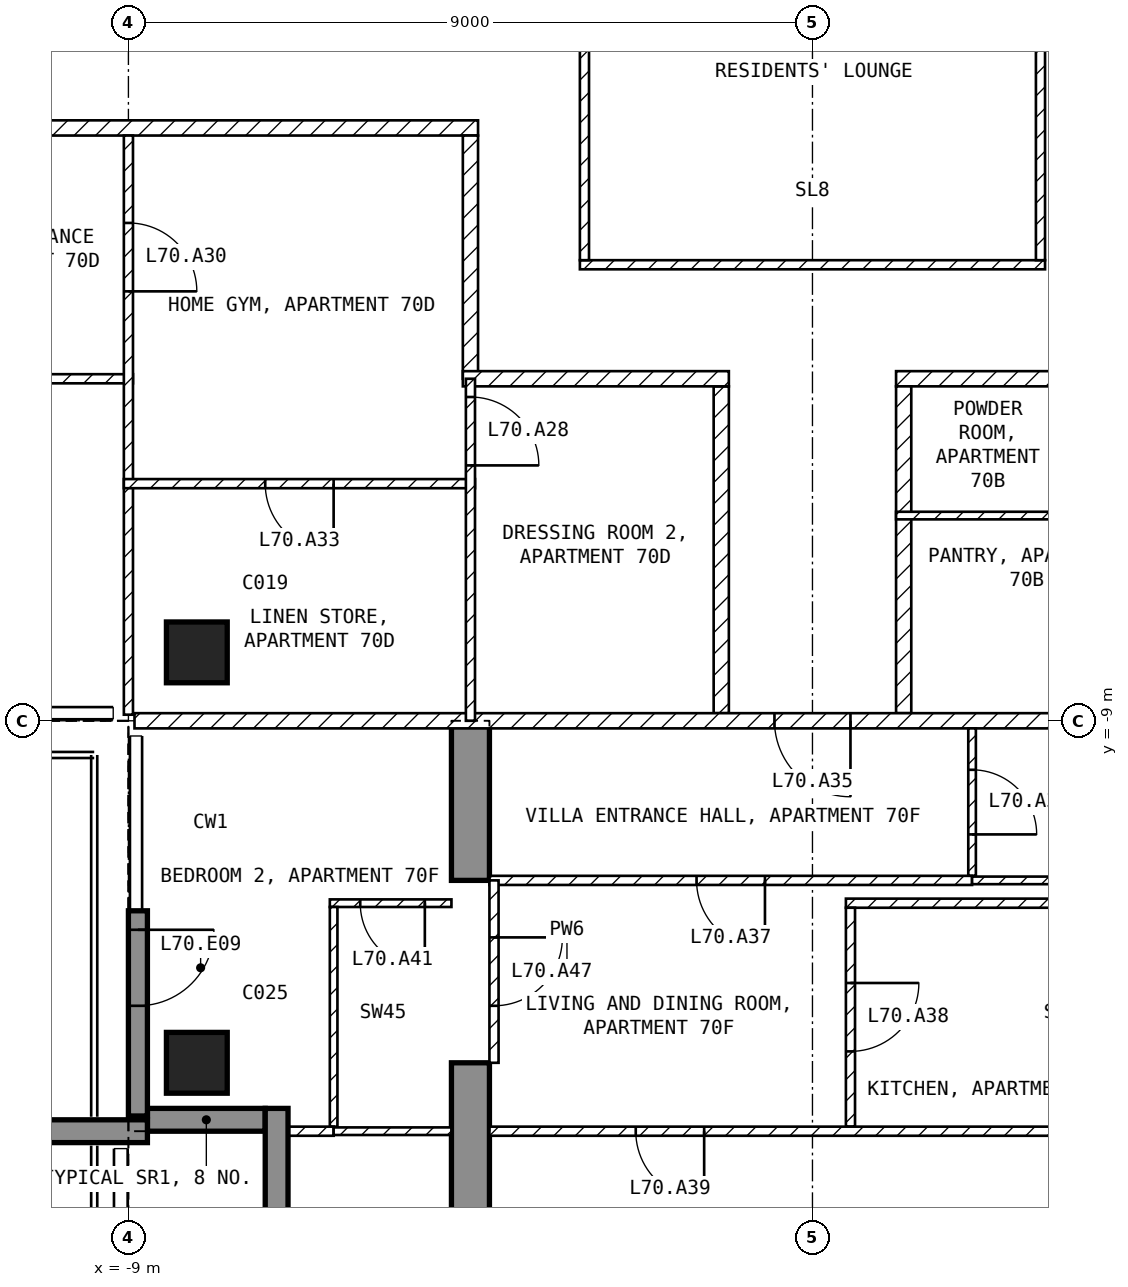
"""IFC4 building model, lengths in metres.
Left out: names, types, materials, properties, quantities, classifications, styles, units other than length and angle.
Written with IfcOpenShell. Run it as: python <this file> out.ifc"""

import sys

from ifc_helpers import new_model, si_unit, direction, frame, frame_2d, origin, origin_2d, place, context, subcontext, project, spatial, polyline, rectangle, outline, extrude, element, fill, save


model = new_model("IFC4")
c1 = context("Model", 3, precision=1e-05, world=origin(), true_north=direction((0.0, 1.0)))
c2 = subcontext(c1, "Body", "Model", "MODEL_VIEW")
j1 = project(units=[si_unit("LENGTHUNIT", "METRE"), si_unit("PLANEANGLEUNIT", "RADIAN")], contexts=[c1])
p1 = place(None, origin())
s1 = spatial("IfcSite", under=j1, at=p1, CompositionType="ELEMENT")
p2 = place(p1, origin())
s2 = spatial("IfcBuilding", under=s1, at=p2, CompositionType="ELEMENT")
p3 = place(p2, frame((0.0, 0.0, 274.5)))
s3 = spatial("IfcBuildingStorey", under=s2, at=p3, CompositionType="ELEMENT", Elevation=274.5)
for number, where, z_axis, x_axis in (
    (1, (-8.1, -13.5, -0.25), (0.0, 0.0, 1.0), (1.0, 0.0, 0.0)),
    (2, (-8.1, -8.1, -0.25), (0.0, 0.0, 1.0), (1.0, 0.0, 0.0)),
):
    element("IfcColumn", number, at=place(p3, frame(where, z_axis=z_axis, x_axis=x_axis)), inside=s3, PredefinedType="COLUMN", context=c2, shape_type="SweptSolid", body=[
        extrude(rectangle(XDim=0.8, YDim=0.8, at=origin_2d()), origin(), (0.0, 0.0, 1.0), 3.5),
    ])
p4 = place(p3, frame((-4.75, -16.7, -0.25), z_axis=(1.0, 0.0, 0.0), x_axis=(0.0, 1.0, 0.0)))
e3 = element("IfcWall", 3, at=p4, inside=s3, PredefinedType="SHEAR", context=c2, shape_type="SweptSolid", body=[
    extrude(outline(polyline([(0.0, 0.0), (3.2, 0.0), (3.2, 2.65), (5.6, 2.65), (5.6, 0.0), (7.7, 0.0), (7.7, 3.5), (0.0, 3.5), (0.0, 0.0)])), origin(), (0.0, 0.0, 1.0), 0.5),
])
p5 = place(p3, frame((-8.875, -11.5, 0.0), z_axis=(0.0, 0.0, 1.0), x_axis=(0.0, -1.0, 0.0)))
e4 = element("IfcWall", 4, at=p5, inside=s3, PredefinedType="SOLIDWALL", context=c2, shape_type="SweptSolid", body=[
    extrude(rectangle(XDim=2.7, YDim=0.25, at=frame_2d((1.35, 0.0))), origin(), (0.0, 0.0, 1.0), 3.25),
])
p6 = place(p5, frame((0.25, 0.0, 0.0)))
e5 = element("IfcOpeningElement", 5, at=p6, cuts=e4, PredefinedType="OPENING", context=c2, shape_type="SweptSolid", body=[
    extrude(rectangle(XDim=1.0, YDim=2.4, at=frame_2d((0.5, 1.2))), frame((0.0, 0.135, 0.0), z_axis=(0.0, -1.0, 0.0), x_axis=(1.0, 0.0, 0.0)), (0.0, 0.0, 1.0), 0.27),
])
p7 = place(p3, frame((-8.75, -14.25, 0.0), z_axis=(0.0, 0.0, 1.0), x_axis=(1.0, 0.0, 0.0)))
e6 = element("IfcWall", 6, at=p7, inside=s3, PredefinedType="SOLIDWALL", context=c2, shape_type="SweptSolid", body=[
    extrude(rectangle(XDim=1.55, YDim=0.3, at=frame_2d((0.775, 0.0))), origin(), (0.0, 0.0, 1.0), 3.25),
])
p8 = place(p3, frame((-7.05, -14.1, 0.0), z_axis=(0.0, 0.0, 1.0), x_axis=(0.0, -1.0, 0.0)))
e7 = element("IfcWall", 7, at=p8, inside=s3, PredefinedType="SOLIDWALL", context=c2, shape_type="SweptSolid", body=[
    extrude(rectangle(XDim=1.8, YDim=0.3, at=frame_2d((0.9, 0.0))), origin(), (0.0, 0.0, 1.0), 3.25),
])
p9 = place(p3, frame((-8.75, -14.4, 0.0), z_axis=(0.0, 0.0, 1.0), x_axis=(-1.0, 0.0, 0.0)))
e8 = element("IfcWall", 8, at=p9, inside=s3, PredefinedType="SOLIDWALL", context=c2, shape_type="SweptSolid", body=[
    extrude(rectangle(XDim=2.95, YDim=0.3, at=frame_2d((1.475, 0.0))), origin(), (0.0, 0.0, 1.0), 3.25),
])
p10 = place(p3, frame((-3.06, -3.0, 0.0), z_axis=(0.0, 0.0, 1.0), x_axis=(1.0, 0.0, 0.0)))
e9 = element("IfcWall", 9, at=p10, inside=s3, PredefinedType="PARTITIONING", context=c2, shape_type="SweptSolid", body=[
    extrude(rectangle(XDim=6.12, YDim=0.12, at=frame_2d((3.06, 0.0))), origin(), (0.0, 0.0, 1.0), 3.25),
])
for number, where, z_axis, x_axis in (
    (10, (3.0, -2.94, 0.0), (0.0, 0.0, 1.0), (0.0, 1.0, 0.0)),
    (11, (-3.0, 2.94, 0.0), (0.0, 0.0, 1.0), (0.0, -1.0, 0.0)),
):
    element("IfcWall", number, at=place(p3, frame(where, z_axis=z_axis, x_axis=x_axis)), inside=s3, PredefinedType="PARTITIONING", context=c2, shape_type="SweptSolid", body=[
        extrude(rectangle(XDim=5.88, YDim=0.12, at=frame_2d((2.94, 0.0))), origin(), (0.0, 0.0, 1.0), 3.25),
    ])
p11 = place(p3, frame((4.6, -4.5, 0.0), z_axis=(0.0, 0.0, 1.0), x_axis=(-1.0, 0.0, 0.0)))
e12 = element("IfcWall", 12, at=p11, inside=s3, PredefinedType="PARTITIONING", context=c2, shape_type="SweptSolid", body=[
    extrude(rectangle(XDim=3.5, YDim=0.2, at=frame_2d((1.75, 0.0))), origin(), (0.0, 0.0, 1.0), 3.25),
])
p12 = place(p3, frame((1.2, -4.6, 0.0), z_axis=(0.0, 0.0, 1.0), x_axis=(0.0, -1.0, 0.0)))
e13 = element("IfcWall", 13, at=p12, inside=s3, PredefinedType="PARTITIONING", context=c2, shape_type="SweptSolid", body=[
    extrude(rectangle(XDim=4.3, YDim=0.2, at=frame_2d((2.15, 0.0))), origin(), (0.0, 0.0, 1.0), 3.25),
])
p13 = place(p3, frame((-4.4, -1.2, 0.0), z_axis=(0.0, 0.0, 1.0), x_axis=(-1.0, 0.0, 0.0)))
e14 = element("IfcWall", 14, at=p13, inside=s3, PredefinedType="PARTITIONING", context=c2, shape_type="SweptSolid", body=[
    extrude(rectangle(XDim=17.2, YDim=0.2, at=frame_2d((8.6, 0.0))), origin(), (0.0, 0.0, 1.0), 3.25),
])
p14 = place(p13, frame((5.9, 0.0, 0.0)))
e15 = element("IfcOpeningElement", 15, at=p14, cuts=e14, PredefinedType="OPENING", context=c2, shape_type="SweptSolid", body=[
    extrude(rectangle(XDim=1.0, YDim=2.1, at=frame_2d((0.5, 1.05))), frame((0.0, 0.11, 0.0), z_axis=(0.0, -1.0, 0.0), x_axis=(1.0, 0.0, 0.0)), (0.0, 0.0, 1.0), 0.22),
])
p15 = place(p3, frame((-4.5, -4.5, 0.0), z_axis=(0.0, 0.0, 1.0), x_axis=(0.0, 1.0, 0.0)))
e16 = element("IfcWall", 16, at=p15, inside=s3, PredefinedType="PARTITIONING", context=c2, shape_type="SweptSolid", body=[
    extrude(rectangle(XDim=3.2, YDim=0.2, at=frame_2d((1.6, 0.0))), origin(), (0.0, 0.0, 1.0), 3.25),
])
p16 = place(p3, frame((-1.2, -8.9, 0.0), z_axis=(0.0, 0.0, 1.0), x_axis=(0.0, 1.0, 0.0)))
e17 = element("IfcWall", 17, at=p16, inside=s3, PredefinedType="PARTITIONING", context=c2, shape_type="SweptSolid", body=[
    extrude(rectangle(XDim=4.3, YDim=0.2, at=frame_2d((2.15, 0.0))), origin(), (0.0, 0.0, 1.0), 3.25),
])
p17 = place(p3, frame((-1.1, -4.5, 0.0), z_axis=(0.0, 0.0, 1.0), x_axis=(-1.0, 0.0, 0.0)))
e18 = element("IfcWall", 18, at=p17, inside=s3, PredefinedType="PARTITIONING", context=c2, shape_type="SweptSolid", body=[
    extrude(rectangle(XDim=3.5, YDim=0.2, at=frame_2d((1.75, 0.0))), origin(), (0.0, 0.0, 1.0), 3.25),
])
p18 = place(p3, frame((8.92, -9.0, 0.0), z_axis=(0.0, 0.0, 1.0), x_axis=(-1.0, 0.0, 0.0)))
e19 = element("IfcWall", 19, at=p18, inside=s3, PredefinedType="PARTITIONING", context=c2, shape_type="SweptSolid", body=[
    extrude(rectangle(XDim=17.84, YDim=0.2, at=frame_2d((8.92, 0.0))), origin(), (0.0, 0.0, 1.0), 3.25),
])
p19 = place(p18, frame((8.42, 0.0, 0.0)))
e20 = element("IfcOpeningElement", 20, at=p19, cuts=e19, PredefinedType="OPENING", context=c2, shape_type="SweptSolid", body=[
    extrude(rectangle(XDim=1.0, YDim=2.1, at=frame_2d((0.5, 1.05))), frame((0.0, 0.11, 0.0), z_axis=(0.0, -1.0, 0.0), x_axis=(1.0, 0.0, 0.0)), (0.0, 0.0, 1.0), 0.22),
])
p20 = place(p3, frame((4.56, -6.3, 0.0), z_axis=(0.0, 0.0, 1.0), x_axis=(-1.0, 0.0, 0.0)))
e21 = element("IfcWall", 21, at=p20, inside=s3, PredefinedType="PARTITIONING", context=c2, shape_type="SweptSolid", body=[
    extrude(rectangle(XDim=3.46, YDim=0.1, at=frame_2d((1.73, 0.0))), origin(), (0.0, 0.0, 1.0), 3.25),
])
p21 = place(p3, frame((-8.94, -4.5, 0.0), z_axis=(0.0, 0.0, 1.0), x_axis=(-1.0, 0.0, 0.0)))
e22 = element("IfcWall", 22, at=p21, inside=s3, PredefinedType="PARTITIONING", context=c2, shape_type="SweptSolid", body=[
    extrude(rectangle(XDim=8.46, YDim=0.12, at=frame_2d((4.23, 0.0))), origin(), (0.0, 0.0, 1.0), 3.25),
])
p22 = place(p21, frame((7.11, 0.0, 0.0)))
e23 = element("IfcOpeningElement", 23, at=p22, cuts=e22, PredefinedType="OPENING", context=c2, shape_type="SweptSolid", body=[
    extrude(rectangle(XDim=0.9, YDim=2.1, at=frame_2d((0.45, 1.05))), frame((0.0, 0.07, 0.0), z_axis=(0.0, -1.0, 0.0), x_axis=(1.0, 0.0, 0.0)), (0.0, 0.0, 1.0), 0.14),
])
p23 = place(p21, frame((1.41, 0.0, 0.0)))
e24 = element("IfcOpeningElement", 24, at=p23, cuts=e22, PredefinedType="OPENING", context=c2, shape_type="SweptSolid", body=[
    extrude(rectangle(XDim=0.9, YDim=2.1, at=frame_2d((0.45, 1.05))), frame((0.0, 0.07, 0.0), z_axis=(0.0, -1.0, 0.0), x_axis=(1.0, 0.0, 0.0)), (0.0, 0.0, 1.0), 0.14),
])
p24 = place(p3, frame((-9.0, -1.3, 0.0), z_axis=(0.0, 0.0, 1.0), x_axis=(0.0, -1.0, 0.0)))
e25 = element("IfcWall", 25, at=p24, inside=s3, PredefinedType="PARTITIONING", context=c2, shape_type="SweptSolid", body=[
    extrude(rectangle(XDim=7.62, YDim=0.12, at=frame_2d((3.81, 0.0))), origin(), (0.0, 0.0, 1.0), 3.25),
])
p25 = place(p24, frame((1.15, 0.0, 0.0)))
e26 = element("IfcOpeningElement", 26, at=p25, cuts=e25, PredefinedType="OPENING", context=c2, shape_type="SweptSolid", body=[
    extrude(rectangle(XDim=0.9, YDim=2.1, at=frame_2d((0.45, 1.05))), frame((0.0, 0.07, 0.0), z_axis=(0.0, -1.0, 0.0), x_axis=(1.0, 0.0, 0.0)), (0.0, 0.0, 1.0), 0.14),
])
p26 = place(p3, frame((-4.44, -5.88, 0.0), z_axis=(0.0, 0.0, 1.0), x_axis=(-1.0, 0.0, 0.0)))
e27 = element("IfcWall", 27, at=p26, inside=s3, PredefinedType="PARTITIONING", context=c2, shape_type="SweptSolid", body=[
    extrude(rectangle(XDim=4.62, YDim=0.12, at=frame_2d((2.31, 0.0))), origin(), (0.0, 0.0, 1.0), 3.25),
])
p27 = place(p26, frame((1.86, 0.0, 0.0)))
e28 = element("IfcOpeningElement", 28, at=p27, cuts=e27, PredefinedType="OPENING", context=c2, shape_type="SweptSolid", body=[
    extrude(rectangle(XDim=0.9, YDim=2.1, at=frame_2d((0.45, 1.05))), frame((0.0, 0.07, 0.0), z_axis=(0.0, -1.0, 0.0), x_axis=(1.0, 0.0, 0.0)), (0.0, 0.0, 1.0), 0.14),
])
p28 = place(p3, frame((-4.5, -4.5, 0.0), z_axis=(0.0, 0.0, 1.0), x_axis=(0.0, -1.0, 0.0)))
e29 = element("IfcWall", 29, at=p28, inside=s3, PredefinedType="PARTITIONING", context=c2, shape_type="SweptSolid", body=[
    extrude(rectangle(XDim=4.5, YDim=0.12, at=frame_2d((2.25, 0.0))), origin(), (0.0, 0.0, 1.0), 3.25),
])
p29 = place(p28, frame((0.24, 0.0, 0.0)))
e30 = element("IfcOpeningElement", 30, at=p29, cuts=e29, PredefinedType="OPENING", context=c2, shape_type="SweptSolid", body=[
    extrude(rectangle(XDim=0.9, YDim=2.1, at=frame_2d((0.45, 1.05))), frame((0.0, 0.07, 0.0), z_axis=(0.0, -1.0, 0.0), x_axis=(1.0, 0.0, 0.0)), (0.0, 0.0, 1.0), 0.14),
])
p30 = place(p3, frame((2.1, -9.1, 0.0), z_axis=(0.0, 0.0, 1.0), x_axis=(0.0, -1.0, 0.0)))
e31 = element("IfcWall", 31, at=p30, inside=s3, PredefinedType="PARTITIONING", context=c2, shape_type="SweptSolid", body=[
    extrude(rectangle(XDim=1.94, YDim=0.1, at=frame_2d((0.97, 0.0))), origin(), (0.0, 0.0, 1.0), 3.25),
])
p31 = place(p30, frame((0.545, 0.0, 0.0)))
e32 = element("IfcOpeningElement", 32, at=p31, cuts=e31, PredefinedType="OPENING", context=c2, shape_type="SweptSolid", body=[
    extrude(rectangle(XDim=0.85, YDim=2.1, at=frame_2d((0.425, 1.05))), frame((0.0, 0.06, 0.0), z_axis=(0.0, -1.0, 0.0), x_axis=(1.0, 0.0, 0.0)), (0.0, 0.0, 1.0), 0.12),
])
p32 = place(p3, frame((2.1, -11.1, 0.0), z_axis=(0.0, 0.0, 1.0), x_axis=(-1.0, 0.0, 0.0)))
e33 = element("IfcWall", 33, at=p32, inside=s3, PredefinedType="PARTITIONING", context=c2, shape_type="SweptSolid", body=[
    extrude(rectangle(XDim=6.35, YDim=0.12, at=frame_2d((3.175, 0.0))), origin(), (0.0, 0.0, 1.0), 3.25),
])
p33 = place(p32, frame((2.725, 0.0, 0.0)))
e34 = element("IfcOpeningElement", 34, at=p33, cuts=e33, PredefinedType="OPENING", context=c2, shape_type="SweptSolid", body=[
    extrude(rectangle(XDim=0.9, YDim=2.1, at=frame_2d((0.45, 1.05))), frame((0.0, 0.07, 0.0), z_axis=(0.0, -1.0, 0.0), x_axis=(1.0, 0.0, 0.0)), (0.0, 0.0, 1.0), 0.14),
])
p34 = place(p3, frame((4.25, -11.1, 0.0), z_axis=(0.0, 0.0, 1.0), x_axis=(-1.0, 0.0, 0.0)))
e35 = element("IfcWall", 35, at=p34, inside=s3, PredefinedType="PARTITIONING", context=c2, shape_type="SweptSolid", body=[
    extrude(rectangle(XDim=2.15, YDim=0.1, at=frame_2d((1.075, 0.0))), origin(), (0.0, 0.0, 1.0), 3.25),
])
p35 = place(p3, frame((4.25, -11.4, 0.0), z_axis=(0.0, 0.0, 1.0), x_axis=(-1.0, 0.0, 0.0)))
e36 = element("IfcWall", 36, at=p35, inside=s3, PredefinedType="PARTITIONING", context=c2, shape_type="SweptSolid", body=[
    extrude(rectangle(XDim=3.81, YDim=0.12, at=frame_2d((1.905, 0.0))), origin(), (0.0, 0.0, 1.0), 3.25),
])
p36 = place(p3, frame((0.5, -11.46, 0.0), z_axis=(0.0, 0.0, 1.0), x_axis=(0.0, -1.0, 0.0)))
e37 = element("IfcWall", 37, at=p36, inside=s3, PredefinedType="PARTITIONING", context=c2, shape_type="SweptSolid", body=[
    extrude(rectangle(XDim=2.88, YDim=0.12, at=frame_2d((1.44, 0.0))), origin(), (0.0, 0.0, 1.0), 3.25),
])
p37 = place(p36, frame((0.99, 0.0, 0.0)))
e38 = element("IfcOpeningElement", 38, at=p37, cuts=e37, PredefinedType="OPENING", context=c2, shape_type="SweptSolid", body=[
    extrude(rectangle(XDim=0.9, YDim=2.1, at=frame_2d((0.45, 1.05))), frame((0.0, 0.07, 0.0), z_axis=(0.0, -1.0, 0.0), x_axis=(1.0, 0.0, 0.0)), (0.0, 0.0, 1.0), 0.14),
])
p38 = place(p3, frame((4.25, -14.4, 0.0), z_axis=(0.0, 0.0, 1.0), x_axis=(-1.0, 0.0, 0.0)))
e39 = element("IfcWall", 39, at=p38, inside=s3, PredefinedType="PARTITIONING", context=c2, shape_type="SweptSolid", body=[
    extrude(rectangle(XDim=8.5, YDim=0.12, at=frame_2d((4.25, 0.0))), origin(), (0.0, 0.0, 1.0), 3.25),
])
p39 = place(p38, frame((5.675, 0.0, 0.0)))
e40 = element("IfcOpeningElement", 40, at=p39, cuts=e39, PredefinedType="OPENING", context=c2, shape_type="SweptSolid", body=[
    extrude(rectangle(XDim=0.9, YDim=2.1, at=frame_2d((0.45, 1.05))), frame((0.0, 0.07, 0.0), z_axis=(0.0, -1.0, 0.0), x_axis=(1.0, 0.0, 0.0)), (0.0, 0.0, 1.0), 0.14),
])
p40 = place(p3, frame((-4.75, -11.4, 0.0), z_axis=(0.0, 0.0, 1.0), x_axis=(-1.0, 0.0, 0.0)))
e41 = element("IfcWall", 41, at=p40, inside=s3, PredefinedType="PARTITIONING", context=c2, shape_type="SweptSolid", body=[
    extrude(rectangle(XDim=1.6, YDim=0.1, at=frame_2d((0.8, 0.0))), origin(), (0.0, 0.0, 1.0), 3.25),
])
p41 = place(p40, frame((0.35, 0.0, 0.0)))
e42 = element("IfcOpeningElement", 42, at=p41, cuts=e41, PredefinedType="OPENING", context=c2, shape_type="SweptSolid", body=[
    extrude(rectangle(XDim=0.85, YDim=2.1, at=frame_2d((0.425, 1.05))), frame((0.0, 0.06, 0.0), z_axis=(0.0, -1.0, 0.0), x_axis=(1.0, 0.0, 0.0)), (0.0, 0.0, 1.0), 0.12),
])
p42 = place(p3, frame((-6.3, -11.45, 0.0), z_axis=(0.0, 0.0, 1.0), x_axis=(0.0, -1.0, 0.0)))
e43 = element("IfcWall", 43, at=p42, inside=s3, PredefinedType="PARTITIONING", context=c2, shape_type="SweptSolid", body=[
    extrude(rectangle(XDim=2.89, YDim=0.1, at=frame_2d((1.445, 0.0))), origin(), (0.0, 0.0, 1.0), 3.25),
])
p43 = place(p3, frame((-6.3, -14.4, 0.0), z_axis=(0.0, 0.0, 1.0), x_axis=(-1.0, 0.0, 0.0)))
e44 = element("IfcWall", 44, at=p43, inside=s3, PredefinedType="PARTITIONING", context=c2, shape_type="SweptSolid", body=[
    extrude(rectangle(XDim=0.82, YDim=0.12, at=frame_2d((0.41, 0.0))), origin(), (0.0, 0.0, 1.0), 3.25),
])
p44 = place(p3, frame((-4.75, -14.4, 0.0), z_axis=(0.0, 0.0, 1.0), x_axis=(-1.0, 0.0, 0.0)))
e45 = element("IfcWall", 45, at=p44, inside=s3, PredefinedType="PARTITIONING", context=c2, shape_type="SweptSolid", body=[
    extrude(rectangle(XDim=1.55, YDim=0.1, at=frame_2d((0.775, 0.0))), origin(), (0.0, 0.0, 1.0), 3.25),
])
p45 = place(p3, frame((-4.19, -11.1, 0.0), z_axis=(0.0, 0.0, 1.0), x_axis=(0.0, -1.0, 0.0)))
e46 = element("IfcWall", 46, at=p45, inside=s3, PredefinedType="PARTITIONING", context=c2, shape_type="SweptSolid", body=[
    extrude(rectangle(XDim=2.4, YDim=0.12, at=frame_2d((1.2, 0.0))), origin(), (0.0, 0.0, 1.0), 2.4),
])
p46 = place(p45, frame((0.75, 0.0, 0.0)))
e47 = element("IfcOpeningElement", 47, at=p46, cuts=e46, PredefinedType="OPENING", context=c2, shape_type="SweptSolid", body=[
    extrude(rectangle(XDim=0.9, YDim=2.1, at=frame_2d((0.45, 1.05))), frame((0.0, 0.07, 0.0), z_axis=(0.0, -1.0, 0.0), x_axis=(1.0, 0.0, 0.0)), (0.0, 0.0, 1.0), 0.14),
])
p47 = place(p6, origin())
e48 = element("IfcDoor", 48, at=p47, inside=s3, OperationType="SINGLE_SWING_LEFT", PredefinedType="DOOR", context=c2, shape_type="SweptSolid", body=[
    extrude(rectangle(XDim=1.0, YDim=2.4, at=frame_2d((0.5, 1.2))), frame((0.0, 0.025, 0.0), z_axis=(0.0, -1.0, 0.0), x_axis=(1.0, 0.0, 0.0)), (0.0, 0.0, 1.0), 0.05),
])
fill(e5, e48)
p48 = place(p29, origin())
e49 = element("IfcDoor", 49, at=p48, inside=s3, OperationType="SINGLE_SWING_RIGHT", PredefinedType="DOOR", context=c2, shape_type="SweptSolid", body=[
    extrude(rectangle(XDim=0.9, YDim=2.1, at=frame_2d((0.45, 1.05))), frame((0.0, 0.025, 0.0), z_axis=(0.0, -1.0, 0.0), x_axis=(1.0, 0.0, 0.0)), (0.0, 0.0, 1.0), 0.05),
])
fill(e30, e49)
p49 = place(p25, origin())
e50 = element("IfcDoor", 50, at=p49, inside=s3, OperationType="SINGLE_SWING_RIGHT", PredefinedType="DOOR", context=c2, shape_type="SweptSolid", body=[
    extrude(rectangle(XDim=0.9, YDim=2.1, at=frame_2d((0.45, 1.05))), frame((0.0, 0.025, 0.0), z_axis=(0.0, -1.0, 0.0), x_axis=(1.0, 0.0, 0.0)), (0.0, 0.0, 1.0), 0.05),
])
fill(e26, e50)
p50 = place(p27, origin())
e51 = element("IfcDoor", 51, at=p50, inside=s3, OperationType="SINGLE_SWING_LEFT", PredefinedType="DOOR", context=c2, shape_type="SweptSolid", body=[
    extrude(rectangle(XDim=0.9, YDim=2.1, at=frame_2d((0.45, 1.05))), frame((0.0, 0.025, 0.0), z_axis=(0.0, -1.0, 0.0), x_axis=(1.0, 0.0, 0.0)), (0.0, 0.0, 1.0), 0.05),
])
fill(e28, e51)
p51 = place(p19, origin())
e52 = element("IfcDoor", 52, at=p51, inside=s3, OperationType="SINGLE_SWING_LEFT", PredefinedType="DOOR", context=c2, shape_type="SweptSolid", body=[
    extrude(rectangle(XDim=1.0, YDim=2.1, at=frame_2d((0.5, 1.05))), frame((0.0, 0.025, 0.0), z_axis=(0.0, -1.0, 0.0), x_axis=(1.0, 0.0, 0.0)), (0.0, 0.0, 1.0), 0.05),
])
fill(e20, e52)
p52 = place(p31, origin())
e53 = element("IfcDoor", 53, at=p52, inside=s3, OperationType="SINGLE_SWING_RIGHT", PredefinedType="DOOR", context=c2, shape_type="SweptSolid", body=[
    extrude(rectangle(XDim=0.85, YDim=2.1, at=frame_2d((0.425, 1.05))), frame((0.0, 0.025, 0.0), z_axis=(0.0, -1.0, 0.0), x_axis=(1.0, 0.0, 0.0)), (0.0, 0.0, 1.0), 0.05),
])
fill(e32, e53)
p53 = place(p33, origin())
e54 = element("IfcDoor", 54, at=p53, inside=s3, OperationType="SINGLE_SWING_LEFT", PredefinedType="DOOR", context=c2, shape_type="SweptSolid", body=[
    extrude(rectangle(XDim=0.9, YDim=2.1, at=frame_2d((0.45, 1.05))), frame((0.0, 0.025, 0.0), z_axis=(0.0, -1.0, 0.0), x_axis=(1.0, 0.0, 0.0)), (0.0, 0.0, 1.0), 0.05),
])
fill(e34, e54)
p54 = place(p37, origin())
e55 = element("IfcDoor", 55, at=p54, inside=s3, OperationType="SINGLE_SWING_LEFT", PredefinedType="DOOR", context=c2, shape_type="SweptSolid", body=[
    extrude(rectangle(XDim=0.9, YDim=2.1, at=frame_2d((0.45, 1.05))), frame((0.0, 0.025, 0.0), z_axis=(0.0, -1.0, 0.0), x_axis=(1.0, 0.0, 0.0)), (0.0, 0.0, 1.0), 0.05),
])
fill(e38, e55)
p55 = place(p39, origin())
e56 = element("IfcDoor", 56, at=p55, inside=s3, OperationType="SINGLE_SWING_LEFT", PredefinedType="DOOR", context=c2, shape_type="SweptSolid", body=[
    extrude(rectangle(XDim=0.9, YDim=2.1, at=frame_2d((0.45, 1.05))), frame((0.0, 0.025, 0.0), z_axis=(0.0, -1.0, 0.0), x_axis=(1.0, 0.0, 0.0)), (0.0, 0.0, 1.0), 0.05),
])
fill(e40, e56)
p56 = place(p41, origin())
e57 = element("IfcDoor", 57, at=p56, inside=s3, OperationType="SINGLE_SWING_LEFT", PredefinedType="DOOR", context=c2, shape_type="SweptSolid", body=[
    extrude(rectangle(XDim=0.85, YDim=2.1, at=frame_2d((0.425, 1.05))), frame((0.0, 0.025, 0.0), z_axis=(0.0, -1.0, 0.0), x_axis=(1.0, 0.0, 0.0)), (0.0, 0.0, 1.0), 0.05),
])
fill(e42, e57)
p57 = place(p46, origin())
e58 = element("IfcDoor", 58, at=p57, inside=s3, OperationType="SINGLE_SWING_LEFT", PredefinedType="DOOR", context=c2, shape_type="SweptSolid", body=[
    extrude(rectangle(XDim=0.9, YDim=2.1, at=frame_2d((0.45, 1.05))), frame((0.0, 0.025, 0.0), z_axis=(0.0, -1.0, 0.0), x_axis=(1.0, 0.0, 0.0)), (0.0, 0.0, 1.0), 0.05),
])
fill(e47, e58)
save(model, sys.argv[1])
